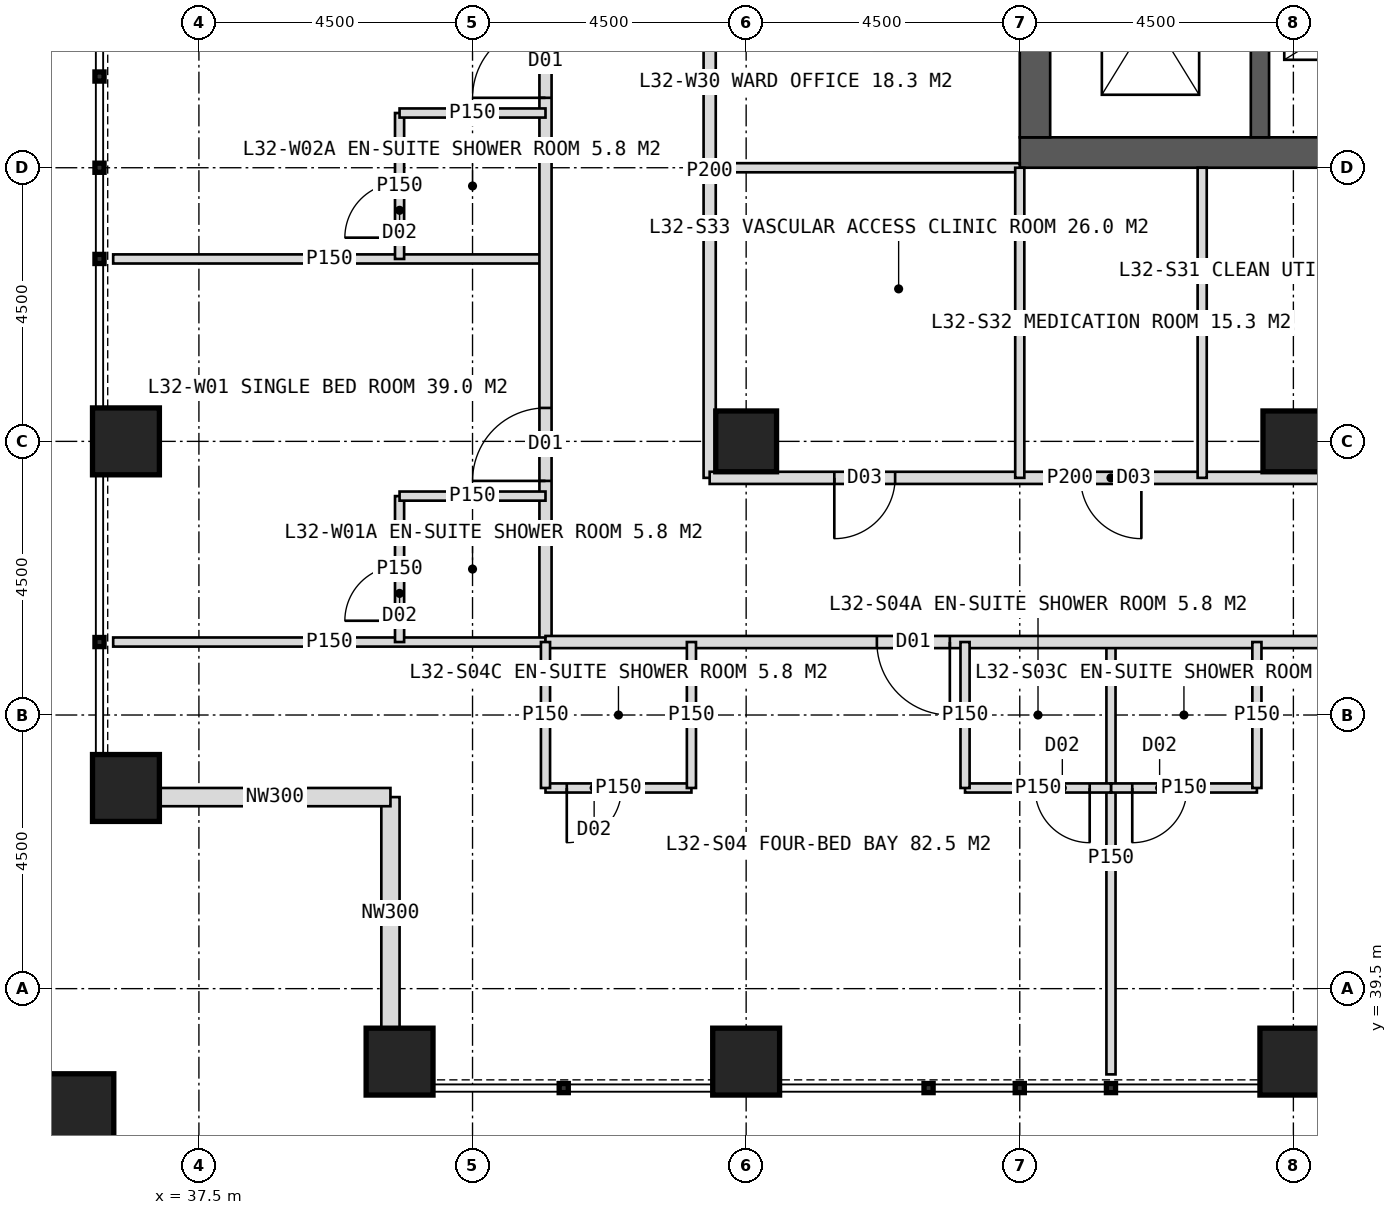
"""IFC4 building model, lengths in metres.
Left out: names, types, materials, properties, quantities, classifications, styles, units other than length and angle.
Written with IfcOpenShell. Run it as: python <this file> out.ifc"""

import sys

from ifc_helpers import new_model, si_unit, direction, frame, frame_2d, origin, origin_2d, place, context, subcontext, project, spatial, rectangle, hollow_rectangle, extrude, element, fill, save


model = new_model("IFC4")
c1 = context("Model", 3, precision=1e-05, world=origin(), true_north=direction((0.0, 1.0)))
c2 = subcontext(c1, "Body", "Model", "MODEL_VIEW")
j1 = project(units=[si_unit("LENGTHUNIT", "METRE"), si_unit("PLANEANGLEUNIT", "RADIAN")], contexts=[c1])
p1 = place(None, origin())
s1 = spatial("IfcSite", under=j1, at=p1, CompositionType="ELEMENT")
p2 = place(p1, origin())
s2 = spatial("IfcBuilding", under=s1, at=p2, CompositionType="ELEMENT")
p3 = place(p2, frame((0.0, 0.0, 136.0)))
s3 = spatial("IfcBuildingStorey", under=s2, at=p3, CompositionType="ELEMENT", Elevation=136.0)
p4 = place(p3, frame((51.0, 53.25, 0.0), z_axis=(0.0, 0.0, 1.0), x_axis=(1.0, 0.0, 0.0)))
e1 = element("IfcWall", 1, at=p4, inside=s3, PredefinedType="SHEAR", context=c2, shape_type="SweptSolid", body=[
    extrude(rectangle(XDim=18.0, YDim=0.5, at=frame_2d((9.0, 0.0))), origin(), (0.0, 0.0, 1.0), 4.0),
])
p5 = place(p4, frame((8.1, 0.0, 0.0)))
e2 = element("IfcOpeningElement", 2, at=p5, cuts=e1, PredefinedType="OPENING", context=c2, shape_type="SweptSolid", body=[
    extrude(rectangle(XDim=1.8, YDim=2.2, at=frame_2d((0.9, 1.1))), frame((0.0, 0.26, 0.0), z_axis=(0.0, -1.0, 0.0), x_axis=(1.0, 0.0, 0.0)), (0.0, 0.0, 1.0), 0.52),
])
p6 = place(p3, frame((51.25, 53.5, 0.0), z_axis=(0.0, 0.0, 1.0), x_axis=(0.0, 1.0, 0.0)))
e3 = element("IfcWall", 3, at=p6, inside=s3, PredefinedType="SHEAR", context=c2, shape_type="SweptSolid", body=[
    extrude(rectangle(XDim=17.0, YDim=0.5, at=frame_2d((8.5, 0.0))), origin(), (0.0, 0.0, 1.0), 4.0),
])
p7 = place(p6, frame((6.0, 0.0, 0.0)))
e4 = element("IfcOpeningElement", 4, at=p7, cuts=e3, PredefinedType="OPENING", context=c2, shape_type="SweptSolid", body=[
    extrude(rectangle(XDim=1.5, YDim=2.2, at=frame_2d((0.75, 1.1))), frame((0.0, 0.26, 0.0), z_axis=(0.0, -1.0, 0.0), x_axis=(1.0, 0.0, 0.0)), (0.0, 0.0, 1.0), 0.52),
])
p8 = place(p3, frame((54.95, 53.5, 0.0), z_axis=(0.0, 0.0, 1.0), x_axis=(0.0, 1.0, 0.0)))
e5 = element("IfcWall", 5, at=p8, inside=s3, PredefinedType="SHEAR", context=c2, shape_type="SweptSolid", body=[
    extrude(rectangle(XDim=17.0, YDim=0.3, at=frame_2d((8.5, 0.0))), origin(), (0.0, 0.0, 1.0), 4.0),
])
for number, where, z_axis, x_axis in (
    (6, (46.5, 48.5, 0.0), (0.0, 0.0, 1.0), (1.0, 0.0, 0.0)),
    (7, (55.5, 48.5, 0.0), (0.0, 0.0, 1.0), (1.0, 0.0, 0.0)),
):
    element("IfcColumn", number, at=place(p3, frame(where, z_axis=z_axis, x_axis=x_axis)), inside=s3, PredefinedType="COLUMN", context=c2, shape_type="SweptSolid", body=[
        extrude(hollow_rectangle(XDim=1.0, YDim=1.0, WallThickness=0.1, at=origin_2d()), origin(), (0.0, 0.0, 1.0), 4.0),
    ])
for number, where, z_axis, x_axis in (
    (8, (40.8, 38.3, 0.0), (0.0, 0.0, 1.0), (1.0, 0.0, 0.0)),
    (9, (36.3, 42.8, 0.0), (0.0, 0.0, 1.0), (1.0, 0.0, 0.0)),
    (10, (46.5, 38.3, 0.0), (0.0, 0.0, 1.0), (1.0, 0.0, 0.0)),
    (11, (36.3, 48.5, 0.0), (0.0, 0.0, 1.0), (1.0, 0.0, 0.0)),
    (12, (55.5, 38.3, 0.0), (0.0, 0.0, 1.0), (1.0, 0.0, 0.0)),
):
    element("IfcColumn", number, at=place(p3, frame(where, z_axis=z_axis, x_axis=x_axis)), inside=s3, PredefinedType="COLUMN", context=c2, shape_type="SweptSolid", body=[
        extrude(hollow_rectangle(XDim=1.1, YDim=1.1, WallThickness=0.1, at=origin_2d()), origin(), (0.0, 0.0, 1.0), 4.0),
    ])
p9 = place(p3, frame((35.4, 37.4, 0.0), z_axis=(0.0, 0.0, 1.0), x_axis=(1.0, 0.0, 0.0)))
e13 = element("IfcColumn", 13, at=p9, inside=s3, PredefinedType="COLUMN", context=c2, shape_type="SweptSolid", body=[
    extrude(hollow_rectangle(XDim=1.4, YDim=1.4, WallThickness=0.08, at=origin_2d()), origin(), (0.0, 0.0, 1.0), 4.0),
])
for number, where, z_axis, x_axis in (
    (14, (40.65, 38.85, 0.0), (0.0, 0.0, 1.0), (0.0, 1.0, 0.0)),
    (15, (40.65, 42.65, 0.0), (0.0, 0.0, 1.0), (-1.0, 0.0, 0.0)),
):
    element("IfcWall", number, at=place(p3, frame(where, z_axis=z_axis, x_axis=x_axis)), inside=s3, PredefinedType="ELEMENTEDWALL", context=c2, shape_type="SweptSolid", body=[
        extrude(rectangle(XDim=3.8, YDim=0.3, at=frame_2d((1.9, 0.0))), origin(), (0.0, 0.0, 1.0), 4.0),
    ])
p10 = place(p3, frame((43.2, 51.5, 0.0), z_axis=(0.0, 0.0, 1.0), x_axis=(-1.0, 0.0, 0.0)))
e16 = element("IfcWall", 16, at=p10, inside=s3, PredefinedType="PARTITIONING", context=c2, shape_type="SweptSolid", body=[
    extrude(rectangle(XDim=7.11, YDim=0.15, at=frame_2d((3.555, 0.0))), origin(), (0.0, 0.0, 1.0), 3.75),
])
p11 = place(p3, frame((43.2, 45.2, 0.0), z_axis=(0.0, 0.0, 1.0), x_axis=(0.0, 1.0, 0.0)))
e17 = element("IfcWall", 17, at=p11, inside=s3, PredefinedType="PARTITIONING", context=c2, shape_type="SweptSolid", body=[
    extrude(rectangle(XDim=33.6, YDim=0.2, at=frame_2d((16.8, 0.0))), origin(), (0.0, 0.0, 1.0), 3.75),
])
p12 = place(p11, frame((2.65, 0.0, 0.0)))
e18 = element("IfcOpeningElement", 18, at=p12, cuts=e17, PredefinedType="OPENING", context=c2, shape_type="SweptSolid", body=[
    extrude(rectangle(XDim=1.2, YDim=2.2, at=frame_2d((0.6, 1.1))), frame((0.0, 0.11, 0.0), z_axis=(0.0, -1.0, 0.0), x_axis=(1.0, 0.0, 0.0)), (0.0, 0.0, 1.0), 0.22),
])
p13 = place(p11, frame((8.95, 0.0, 0.0)))
e19 = element("IfcOpeningElement", 19, at=p13, cuts=e17, PredefinedType="OPENING", context=c2, shape_type="SweptSolid", body=[
    extrude(rectangle(XDim=1.2, YDim=2.2, at=frame_2d((0.6, 1.1))), frame((0.0, 0.11, 0.0), z_axis=(0.0, -1.0, 0.0), x_axis=(1.0, 0.0, 0.0)), (0.0, 0.0, 1.0), 0.22),
])
p14 = place(p11, frame((19.45, 0.0, 0.0)))
e20 = element("IfcOpeningElement", 20, at=p14, cuts=e17, PredefinedType="OPENING", context=c2, shape_type="SweptSolid", body=[
    extrude(rectangle(XDim=1.2, YDim=2.2, at=frame_2d((0.6, 1.1))), frame((0.0, 0.11, 0.0), z_axis=(0.0, -1.0, 0.0), x_axis=(1.0, 0.0, 0.0)), (0.0, 0.0, 1.0), 0.22),
])
p15 = place(p11, frame((28.45, 0.0, 0.0)))
e21 = element("IfcOpeningElement", 21, at=p15, cuts=e17, PredefinedType="OPENING", context=c2, shape_type="SweptSolid", body=[
    extrude(rectangle(XDim=1.2, YDim=2.2, at=frame_2d((0.6, 1.1))), frame((0.0, 0.11, 0.0), z_axis=(0.0, -1.0, 0.0), x_axis=(1.0, 0.0, 0.0)), (0.0, 0.0, 1.0), 0.22),
])
p16 = place(p3, frame((43.2, 45.2, 0.0), z_axis=(0.0, 0.0, 1.0), x_axis=(-1.0, 0.0, 0.0)))
e22 = element("IfcWall", 22, at=p16, inside=s3, PredefinedType="PARTITIONING", context=c2, shape_type="SweptSolid", body=[
    extrude(rectangle(XDim=7.11, YDim=0.15, at=frame_2d((3.555, 0.0))), origin(), (0.0, 0.0, 1.0), 3.75),
])
p17 = place(p3, frame((40.8, 45.2, 0.0), z_axis=(0.0, 0.0, 1.0), x_axis=(0.0, 1.0, 0.0)))
e23 = element("IfcWall", 23, at=p17, inside=s3, PredefinedType="PARTITIONING", context=c2, shape_type="SweptSolid", body=[
    extrude(rectangle(XDim=2.4, YDim=0.15, at=frame_2d((1.2, 0.0))), origin(), (0.0, 0.0, 1.0), 2.997),
])
p18 = place(p17, frame((0.35, 0.0, 0.0)))
e24 = element("IfcOpeningElement", 24, at=p18, cuts=e23, PredefinedType="OPENING", context=c2, shape_type="SweptSolid", body=[
    extrude(rectangle(XDim=0.9, YDim=2.1, at=frame_2d((0.45, 1.05))), frame((0.0, 0.085, 0.0), z_axis=(0.0, -1.0, 0.0), x_axis=(1.0, 0.0, 0.0)), (0.0, 0.0, 1.0), 0.17),
])
p19 = place(p3, frame((43.2, 47.6, 0.0), z_axis=(0.0, 0.0, 1.0), x_axis=(-1.0, 0.0, 0.0)))
e25 = element("IfcWall", 25, at=p19, inside=s3, PredefinedType="PARTITIONING", context=c2, shape_type="SweptSolid", body=[
    extrude(rectangle(XDim=2.4, YDim=0.15, at=frame_2d((1.2, 0.0))), origin(), (0.0, 0.0, 1.0), 3.75),
])
p20 = place(p3, frame((40.8, 51.5, 0.0), z_axis=(0.0, 0.0, 1.0), x_axis=(0.0, 1.0, 0.0)))
e26 = element("IfcWall", 26, at=p20, inside=s3, PredefinedType="PARTITIONING", context=c2, shape_type="SweptSolid", body=[
    extrude(rectangle(XDim=2.4, YDim=0.15, at=frame_2d((1.2, 0.0))), origin(), (0.0, 0.0, 1.0), 3.75),
])
p21 = place(p20, frame((0.35, 0.0, 0.0)))
e27 = element("IfcOpeningElement", 27, at=p21, cuts=e26, PredefinedType="OPENING", context=c2, shape_type="SweptSolid", body=[
    extrude(rectangle(XDim=0.9, YDim=2.1, at=frame_2d((0.45, 1.05))), frame((0.0, 0.085, 0.0), z_axis=(0.0, -1.0, 0.0), x_axis=(1.0, 0.0, 0.0)), (0.0, 0.0, 1.0), 0.17),
])
p22 = place(p3, frame((43.2, 53.9, 0.0), z_axis=(0.0, 0.0, 1.0), x_axis=(-1.0, 0.0, 0.0)))
e28 = element("IfcWall", 28, at=p22, inside=s3, PredefinedType="PARTITIONING", context=c2, shape_type="SweptSolid", body=[
    extrude(rectangle(XDim=2.4, YDim=0.15, at=frame_2d((1.2, 0.0))), origin(), (0.0, 0.0, 1.0), 3.75),
])
p23 = place(p3, frame((51.0, 53.0, 0.0), z_axis=(0.0, 0.0, 1.0), x_axis=(-1.0, 0.0, 0.0)))
e29 = element("IfcWall", 29, at=p23, inside=s3, PredefinedType="PARTITIONING", context=c2, shape_type="SweptSolid", body=[
    extrude(rectangle(XDim=5.1, YDim=0.15, at=frame_2d((2.55, 0.0))), origin(), (0.0, 0.0, 1.0), 3.75),
])
p24 = place(p3, frame((45.9, 47.9, 0.0), z_axis=(0.0, 0.0, 1.0), x_axis=(0.0, 1.0, 0.0)))
e30 = element("IfcWall", 30, at=p24, inside=s3, PredefinedType="PARTITIONING", context=c2, shape_type="SweptSolid", body=[
    extrude(rectangle(XDim=10.1, YDim=0.2, at=frame_2d((5.05, 0.0))), origin(), (0.0, 0.0, 1.0), 3.75),
])
p25 = place(p24, frame((7.1, 0.0, 0.0)))
e31 = element("IfcOpeningElement", 31, at=p25, cuts=e30, PredefinedType="OPENING", context=c2, shape_type="SweptSolid", body=[
    extrude(rectangle(XDim=1.0, YDim=2.1, at=frame_2d((0.5, 1.05))), frame((0.0, 0.11, 0.0), z_axis=(0.0, -1.0, 0.0), x_axis=(1.0, 0.0, 0.0)), (0.0, 0.0, 1.0), 0.22),
])
p26 = place(p3, frame((52.5, 45.2, 0.0), z_axis=(0.0, 0.0, 1.0), x_axis=(0.0, -1.0, 0.0)))
e32 = element("IfcWall", 32, at=p26, inside=s3, PredefinedType="PARTITIONING", context=c2, shape_type="SweptSolid", body=[
    extrude(rectangle(XDim=7.11, YDim=0.15, at=frame_2d((3.555, 0.0))), origin(), (0.0, 0.0, 1.0), 3.75),
])
p27 = place(p3, frame((76.8, 45.2, 0.0), z_axis=(0.0, 0.0, 1.0), x_axis=(-1.0, 0.0, 0.0)))
e33 = element("IfcWall", 33, at=p27, inside=s3, PredefinedType="PARTITIONING", context=c2, shape_type="SweptSolid", body=[
    extrude(rectangle(XDim=33.6, YDim=0.2, at=frame_2d((16.8, 0.0))), origin(), (0.0, 0.0, 1.0), 3.75),
])
p28 = place(p27, frame((2.65, 0.0, 0.0)))
e34 = element("IfcOpeningElement", 34, at=p28, cuts=e33, PredefinedType="OPENING", context=c2, shape_type="SweptSolid", body=[
    extrude(rectangle(XDim=1.2, YDim=2.2, at=frame_2d((0.6, 1.1))), frame((0.0, 0.11, 0.0), z_axis=(0.0, -1.0, 0.0), x_axis=(1.0, 0.0, 0.0)), (0.0, 0.0, 1.0), 0.22),
])
p29 = place(p27, frame((11.05, 0.0, 0.0)))
e35 = element("IfcOpeningElement", 35, at=p29, cuts=e33, PredefinedType="OPENING", context=c2, shape_type="SweptSolid", body=[
    extrude(rectangle(XDim=1.2, YDim=2.2, at=frame_2d((0.6, 1.1))), frame((0.0, 0.11, 0.0), z_axis=(0.0, -1.0, 0.0), x_axis=(1.0, 0.0, 0.0)), (0.0, 0.0, 1.0), 0.22),
])
p30 = place(p27, frame((17.95, 0.0, 0.0)))
e36 = element("IfcOpeningElement", 36, at=p30, cuts=e33, PredefinedType="OPENING", context=c2, shape_type="SweptSolid", body=[
    extrude(rectangle(XDim=1.2, YDim=2.2, at=frame_2d((0.6, 1.1))), frame((0.0, 0.11, 0.0), z_axis=(0.0, -1.0, 0.0), x_axis=(1.0, 0.0, 0.0)), (0.0, 0.0, 1.0), 0.22),
])
p31 = place(p27, frame((26.95, 0.0, 0.0)))
e37 = element("IfcOpeningElement", 37, at=p31, cuts=e33, PredefinedType="OPENING", context=c2, shape_type="SweptSolid", body=[
    extrude(rectangle(XDim=1.2, YDim=2.2, at=frame_2d((0.6, 1.1))), frame((0.0, 0.11, 0.0), z_axis=(0.0, -1.0, 0.0), x_axis=(1.0, 0.0, 0.0)), (0.0, 0.0, 1.0), 0.22),
])
p32 = place(p3, frame((54.9, 42.8, 0.0), z_axis=(0.0, 0.0, 1.0), x_axis=(-1.0, 0.0, 0.0)))
e38 = element("IfcWall", 38, at=p32, inside=s3, PredefinedType="PARTITIONING", context=c2, shape_type="SweptSolid", body=[
    extrude(rectangle(XDim=2.4, YDim=0.15, at=frame_2d((1.2, 0.0))), origin(), (0.0, 0.0, 1.0), 3.75),
])
p33 = place(p32, frame((1.15, 0.0, 0.0)))
e39 = element("IfcOpeningElement", 39, at=p33, cuts=e38, PredefinedType="OPENING", context=c2, shape_type="SweptSolid", body=[
    extrude(rectangle(XDim=0.9, YDim=2.1, at=frame_2d((0.45, 1.05))), frame((0.0, 0.085, 0.0), z_axis=(0.0, -1.0, 0.0), x_axis=(1.0, 0.0, 0.0)), (0.0, 0.0, 1.0), 0.17),
])
p34 = place(p3, frame((54.9, 45.2, 0.0), z_axis=(0.0, 0.0, 1.0), x_axis=(0.0, -1.0, 0.0)))
e40 = element("IfcWall", 40, at=p34, inside=s3, PredefinedType="PARTITIONING", context=c2, shape_type="SweptSolid", body=[
    extrude(rectangle(XDim=2.4, YDim=0.15, at=frame_2d((1.2, 0.0))), origin(), (0.0, 0.0, 1.0), 3.75),
])
p35 = place(p3, frame((52.5, 42.8, 0.0), z_axis=(0.0, 0.0, 1.0), x_axis=(-1.0, 0.0, 0.0)))
e41 = element("IfcWall", 41, at=p35, inside=s3, PredefinedType="PARTITIONING", context=c2, shape_type="SweptSolid", body=[
    extrude(rectangle(XDim=2.4, YDim=0.15, at=frame_2d((1.2, 0.0))), origin(), (0.0, 0.0, 1.0), 3.75),
])
p36 = place(p35, frame((0.35, 0.0, 0.0)))
e42 = element("IfcOpeningElement", 42, at=p36, cuts=e41, PredefinedType="OPENING", context=c2, shape_type="SweptSolid", body=[
    extrude(rectangle(XDim=0.9, YDim=2.1, at=frame_2d((0.45, 1.05))), frame((0.0, 0.085, 0.0), z_axis=(0.0, -1.0, 0.0), x_axis=(1.0, 0.0, 0.0)), (0.0, 0.0, 1.0), 0.17),
])
p37 = place(p3, frame((50.1, 45.2, 0.0), z_axis=(0.0, 0.0, 1.0), x_axis=(0.0, -1.0, 0.0)))
e43 = element("IfcWall", 43, at=p37, inside=s3, PredefinedType="PARTITIONING", context=c2, shape_type="SweptSolid", body=[
    extrude(rectangle(XDim=2.4, YDim=0.15, at=frame_2d((1.2, 0.0))), origin(), (0.0, 0.0, 1.0), 3.75),
])
p38 = place(p3, frame((45.6, 42.8, 0.0), z_axis=(0.0, 0.0, 1.0), x_axis=(-1.0, 0.0, 0.0)))
e44 = element("IfcWall", 44, at=p38, inside=s3, PredefinedType="PARTITIONING", context=c2, shape_type="SweptSolid", body=[
    extrude(rectangle(XDim=2.4, YDim=0.15, at=frame_2d((1.2, 0.0))), origin(), (0.0, 0.0, 1.0), 2.997),
])
p39 = place(p38, frame((1.15, 0.0, 0.0)))
e45 = element("IfcOpeningElement", 45, at=p39, cuts=e44, PredefinedType="OPENING", context=c2, shape_type="SweptSolid", body=[
    extrude(rectangle(XDim=0.9, YDim=2.1, at=frame_2d((0.45, 1.05))), frame((0.0, 0.085, 0.0), z_axis=(0.0, -1.0, 0.0), x_axis=(1.0, 0.0, 0.0)), (0.0, 0.0, 1.0), 0.17),
])
for number, where, z_axis, x_axis in (
    (46, (45.6, 45.2, 0.0), (0.0, 0.0, 1.0), (0.0, -1.0, 0.0)),
    (47, (43.2, 45.2, 0.0), (0.0, 0.0, 1.0), (0.0, -1.0, 0.0)),
):
    element("IfcWall", number, at=place(p3, frame(where, z_axis=z_axis, x_axis=x_axis)), inside=s3, PredefinedType="PARTITIONING", context=c2, shape_type="SweptSolid", body=[
        extrude(rectangle(XDim=2.4, YDim=0.15, at=frame_2d((1.2, 0.0))), origin(), (0.0, 0.0, 1.0), 3.75),
    ])
p40 = place(p3, frame((57.75, 47.9, 0.0), z_axis=(0.0, 0.0, 1.0), x_axis=(-1.0, 0.0, 0.0)))
e48 = element("IfcWall", 48, at=p40, inside=s3, PredefinedType="PARTITIONING", context=c2, shape_type="SweptSolid", body=[
    extrude(rectangle(XDim=11.85, YDim=0.2, at=frame_2d((5.925, 0.0))), origin(), (0.0, 0.0, 1.0), 3.75),
])
p41 = place(p40, frame((0.325, 0.0, 0.0)))
e49 = element("IfcOpeningElement", 49, at=p41, cuts=e48, PredefinedType="OPENING", context=c2, shape_type="SweptSolid", body=[
    extrude(rectangle(XDim=1.0, YDim=2.1, at=frame_2d((0.5, 1.05))), frame((0.0, 0.11, 0.0), z_axis=(0.0, -1.0, 0.0), x_axis=(1.0, 0.0, 0.0)), (0.0, 0.0, 1.0), 0.22),
])
p42 = place(p40, frame((4.75, 0.0, 0.0)))
e50 = element("IfcOpeningElement", 50, at=p42, cuts=e48, PredefinedType="OPENING", context=c2, shape_type="SweptSolid", body=[
    extrude(rectangle(XDim=1.0, YDim=2.1, at=frame_2d((0.5, 1.05))), frame((0.0, 0.11, 0.0), z_axis=(0.0, -1.0, 0.0), x_axis=(1.0, 0.0, 0.0)), (0.0, 0.0, 1.0), 0.22),
])
p43 = place(p40, frame((8.8, 0.0, 0.0)))
e51 = element("IfcOpeningElement", 51, at=p43, cuts=e48, PredefinedType="OPENING", context=c2, shape_type="SweptSolid", body=[
    extrude(rectangle(XDim=1.0, YDim=2.1, at=frame_2d((0.5, 1.05))), frame((0.0, 0.11, 0.0), z_axis=(0.0, -1.0, 0.0), x_axis=(1.0, 0.0, 0.0)), (0.0, 0.0, 1.0), 0.22),
])
for number, where, z_axis, x_axis in (
    (52, (54.0, 53.0, 0.0), (0.0, 0.0, 1.0), (0.0, -1.0, 0.0)),
    (53, (51.0, 53.0, 0.0), (0.0, 0.0, 1.0), (0.0, -1.0, 0.0)),
):
    element("IfcWall", number, at=place(p3, frame(where, z_axis=z_axis, x_axis=x_axis)), inside=s3, PredefinedType="PARTITIONING", context=c2, shape_type="SweptSolid", body=[
        extrude(rectangle(XDim=5.1, YDim=0.15, at=frame_2d((2.55, 0.0))), origin(), (0.0, 0.0, 1.0), 3.75),
    ])
p44 = place(p12, origin())
e54 = element("IfcDoor", 54, at=p44, inside=s3, OperationType="SINGLE_SWING_LEFT", PredefinedType="DOOR", context=c2, shape_type="SweptSolid", body=[
    extrude(rectangle(XDim=1.2, YDim=2.2, at=frame_2d((0.6, 1.1))), frame((0.0, 0.025, 0.0), z_axis=(0.0, -1.0, 0.0), x_axis=(1.0, 0.0, 0.0)), (0.0, 0.0, 1.0), 0.05),
])
fill(e18, e54)
p45 = place(p18, origin())
e55 = element("IfcDoor", 55, at=p45, inside=s3, OperationType="SINGLE_SWING_LEFT", PredefinedType="DOOR", context=c2, shape_type="SweptSolid", body=[
    extrude(rectangle(XDim=0.9, YDim=2.1, at=frame_2d((0.45, 1.05))), frame((0.0, 0.025, 0.0), z_axis=(0.0, -1.0, 0.0), x_axis=(1.0, 0.0, 0.0)), (0.0, 0.0, 1.0), 0.05),
])
fill(e24, e55)
p46 = place(p13, origin())
e56 = element("IfcDoor", 56, at=p46, inside=s3, OperationType="SINGLE_SWING_LEFT", PredefinedType="DOOR", context=c2, shape_type="SweptSolid", body=[
    extrude(rectangle(XDim=1.2, YDim=2.2, at=frame_2d((0.6, 1.1))), frame((0.0, 0.025, 0.0), z_axis=(0.0, -1.0, 0.0), x_axis=(1.0, 0.0, 0.0)), (0.0, 0.0, 1.0), 0.05),
])
fill(e19, e56)
p47 = place(p21, origin())
e57 = element("IfcDoor", 57, at=p47, inside=s3, OperationType="SINGLE_SWING_LEFT", PredefinedType="DOOR", context=c2, shape_type="SweptSolid", body=[
    extrude(rectangle(XDim=0.9, YDim=2.1, at=frame_2d((0.45, 1.05))), frame((0.0, 0.025, 0.0), z_axis=(0.0, -1.0, 0.0), x_axis=(1.0, 0.0, 0.0)), (0.0, 0.0, 1.0), 0.05),
])
fill(e27, e57)
p48 = place(p33, origin())
e58 = element("IfcDoor", 58, at=p48, inside=s3, OperationType="SINGLE_SWING_RIGHT", PredefinedType="DOOR", context=c2, shape_type="SweptSolid", body=[
    extrude(rectangle(XDim=0.9, YDim=2.1, at=frame_2d((0.45, 1.05))), frame((0.0, 0.025, 0.0), z_axis=(0.0, -1.0, 0.0), x_axis=(1.0, 0.0, 0.0)), (0.0, 0.0, 1.0), 0.05),
])
fill(e39, e58)
p49 = place(p31, origin())
e59 = element("IfcDoor", 59, at=p49, inside=s3, OperationType="SINGLE_SWING_LEFT", PredefinedType="DOOR", context=c2, shape_type="SweptSolid", body=[
    extrude(rectangle(XDim=1.2, YDim=2.2, at=frame_2d((0.6, 1.1))), frame((0.0, 0.025, 0.0), z_axis=(0.0, -1.0, 0.0), x_axis=(1.0, 0.0, 0.0)), (0.0, 0.0, 1.0), 0.05),
])
fill(e37, e59)
p50 = place(p36, origin())
e60 = element("IfcDoor", 60, at=p50, inside=s3, OperationType="SINGLE_SWING_LEFT", PredefinedType="DOOR", context=c2, shape_type="SweptSolid", body=[
    extrude(rectangle(XDim=0.9, YDim=2.1, at=frame_2d((0.45, 1.05))), frame((0.0, 0.025, 0.0), z_axis=(0.0, -1.0, 0.0), x_axis=(1.0, 0.0, 0.0)), (0.0, 0.0, 1.0), 0.05),
])
fill(e42, e60)
p51 = place(p39, origin())
e61 = element("IfcDoor", 61, at=p51, inside=s3, OperationType="SINGLE_SWING_RIGHT", PredefinedType="DOOR", context=c2, shape_type="SweptSolid", body=[
    extrude(rectangle(XDim=0.9, YDim=2.1, at=frame_2d((0.45, 1.05))), frame((0.0, 0.025, 0.0), z_axis=(0.0, -1.0, 0.0), x_axis=(1.0, 0.0, 0.0)), (0.0, 0.0, 1.0), 0.05),
])
fill(e45, e61)
p52 = place(p42, origin())
e62 = element("IfcDoor", 62, at=p52, inside=s3, OperationType="SINGLE_SWING_LEFT", PredefinedType="DOOR", context=c2, shape_type="SweptSolid", body=[
    extrude(rectangle(XDim=1.0, YDim=2.1, at=frame_2d((0.5, 1.05))), frame((0.0, 0.025, 0.0), z_axis=(0.0, -1.0, 0.0), x_axis=(1.0, 0.0, 0.0)), (0.0, 0.0, 1.0), 0.05),
])
fill(e50, e62)
p53 = place(p43, origin())
e63 = element("IfcDoor", 63, at=p53, inside=s3, OperationType="SINGLE_SWING_RIGHT", PredefinedType="DOOR", context=c2, shape_type="SweptSolid", body=[
    extrude(rectangle(XDim=1.0, YDim=2.1, at=frame_2d((0.5, 1.05))), frame((0.0, 0.025, 0.0), z_axis=(0.0, -1.0, 0.0), x_axis=(1.0, 0.0, 0.0)), (0.0, 0.0, 1.0), 0.05),
])
fill(e51, e63)
save(model, sys.argv[1])
